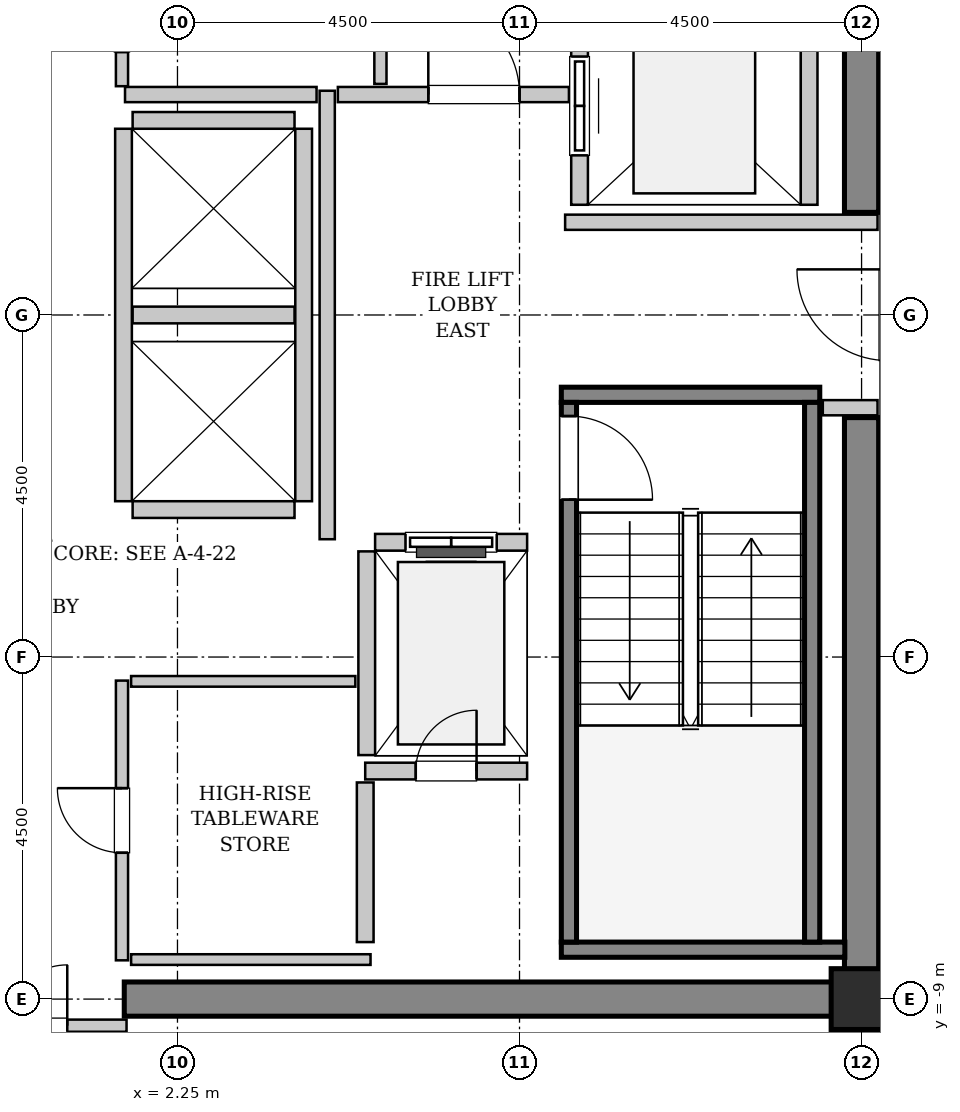
"""IFC4 building model, lengths in metres.
Left out: names, types, materials, properties, quantities, classifications, styles, units other than length and angle.
Written with IfcOpenShell. Run it as: python <this file> out.ifc"""

import sys

from ifc_helpers import new_model, si_unit, direction, frame, frame_2d, origin, origin_2d, place, context, subcontext, project, spatial, rectangle, hollow_rectangle, extrude, source, transform, mapped, element, fill, save


model = new_model("IFC4")
c1 = context("Model", 3, precision=1e-05, world=origin(), true_north=direction((0.0, 1.0)))
c2 = subcontext(c1, "Body", "Model", "MODEL_VIEW")
j1 = project(units=[si_unit("LENGTHUNIT", "METRE"), si_unit("PLANEANGLEUNIT", "RADIAN")], contexts=[c1])
p1 = place(None, origin())
s1 = spatial("IfcSite", under=j1, at=p1, CompositionType="ELEMENT")
p2 = place(p1, origin())
s2 = spatial("IfcBuilding", under=s1, at=p2, CompositionType="ELEMENT")
p3 = place(p2, frame((0.0, 0.0, 283.6)))
s3 = spatial("IfcBuildingStorey", under=s2, at=p3, CompositionType="ELEMENT", Elevation=283.6)
m1 = source(origin(), c2, "Body", "SweptSolid", [
    extrude(rectangle(XDim=9.925, YDim=0.45, at=frame_2d((4.962, 0.0))), origin(), (0.0, 0.0, 1.0), 3.8),
])
p4 = place(p3, frame((1.55, -9.0, 0.0), z_axis=(0.0, 0.0, 1.0), x_axis=(1.0, 0.0, 0.0)))
e1 = element("IfcWall", 1, at=p4, inside=s3, PredefinedType="SHEAR", context=c2, shape_type="MappedRepresentation", body=[
    mapped(m1, transform((0.0, 0.0, 0.0), x_axis=(1.0, 0.0, 0.0), y_axis=(0.0, 1.0, 0.0), z_axis=(0.0, 0.0, 1.0), scale=1.0)),
])
m2 = source(origin(), c2, "Body", "SweptSolid", [
    extrude(rectangle(XDim=7.425, YDim=0.45, at=frame_2d((3.712, 0.0))), origin(), (0.0, 0.0, 1.0), 3.8),
])
for number, where, z_axis, x_axis in (
    (2, (11.25, -8.775, 0.0), (0.0, 0.0, 1.0), (0.0, 1.0, 0.0)),
    (3, (11.25, 1.35, 0.0), (0.0, 0.0, 1.0), (0.0, 1.0, 0.0)),
):
    element("IfcWall", number, at=place(p3, frame(where, z_axis=z_axis, x_axis=x_axis)), inside=s3, PredefinedType="SHEAR", context=c2, shape_type="MappedRepresentation", body=[
        mapped(m2, transform((0.0, 0.0, 0.0), x_axis=(1.0, 0.0, 0.0), y_axis=(0.0, 1.0, 0.0), z_axis=(0.0, 0.0, 1.0), scale=1.0)),
    ])
m3 = source(origin(), c2, "Body", "SweptSolid", [
    extrude(hollow_rectangle(XDim=0.8, YDim=0.8, WallThickness=0.04, InnerFilletRadius=0.04, OuterFilletRadius=0.08, at=origin_2d()), origin(), (0.0, 0.0, 1.0), 3.8),
])
p5 = place(p3, frame((11.25, -9.0, 0.0), z_axis=(0.0, 0.0, 1.0), x_axis=(1.0, 0.0, 0.0)))
e4 = element("IfcColumn", 4, at=p5, inside=s3, PredefinedType="COLUMN", context=c2, shape_type="MappedRepresentation", body=[
    mapped(m3, transform((0.0, 0.0, 0.0), x_axis=(1.0, 0.0, 0.0), y_axis=(0.0, 1.0, 0.0), z_axis=(0.0, 0.0, 1.0), scale=1.0)),
])
m4 = source(origin(), c2, "Body", "SweptSolid", [
    extrude(rectangle(XDim=3.4, YDim=0.2, at=frame_2d((1.7, 0.0))), origin(), (0.0, 0.0, 1.0), 3.8),
])
p6 = place(p3, frame((7.3, -1.05, 0.0), z_axis=(0.0, 0.0, 1.0), x_axis=(1.0, 0.0, 0.0)))
e5 = element("IfcWall", 5, at=p6, inside=s3, PredefinedType="SOLIDWALL", context=c2, shape_type="MappedRepresentation", body=[
    mapped(m4, transform((0.0, 0.0, 0.0), x_axis=(1.0, 0.0, 0.0), y_axis=(0.0, 1.0, 0.0), z_axis=(0.0, 0.0, 1.0), scale=1.0)),
])
m5 = source(origin(), c2, "Body", "SweptSolid", [
    extrude(rectangle(XDim=3.73, YDim=0.2, at=frame_2d((1.865, 0.0))), origin(), (0.0, 0.0, 1.0), 3.8),
])
p7 = place(p3, frame((7.3, -8.35, 0.0), z_axis=(0.0, 0.0, 1.0), x_axis=(1.0, 0.0, 0.0)))
e6 = element("IfcWall", 6, at=p7, inside=s3, PredefinedType="SOLIDWALL", context=c2, shape_type="MappedRepresentation", body=[
    mapped(m5, transform((0.0, 0.0, 0.0), x_axis=(1.0, 0.0, 0.0), y_axis=(0.0, 1.0, 0.0), z_axis=(0.0, 0.0, 1.0), scale=1.0)),
])
m6 = source(origin(), c2, "Body", "SweptSolid", [
    extrude(rectangle(XDim=7.1, YDim=0.2, at=frame_2d((3.55, 0.0))), origin(), (0.0, 0.0, 1.0), 3.8),
])
p8 = place(p3, frame((7.4, -1.15, 0.0), z_axis=(0.0, 0.0, 1.0), x_axis=(0.0, -1.0, 0.0)))
e7 = element("IfcWall", 7, at=p8, inside=s3, PredefinedType="SOLIDWALL", context=c2, shape_type="MappedRepresentation", body=[
    mapped(m6, transform((0.0, 0.0, 0.0), x_axis=(1.0, 0.0, 0.0), y_axis=(0.0, 1.0, 0.0), z_axis=(0.0, 0.0, 1.0), scale=1.0)),
])
p9 = place(p8, frame((0.18, 0.0, 0.0)))
e8 = element("IfcOpeningElement", 8, at=p9, cuts=e7, PredefinedType="OPENING", context=c2, shape_type="SweptSolid", body=[
    extrude(rectangle(XDim=1.1, YDim=2.15, at=frame_2d((0.55, 1.075))), frame((0.0, 0.11, 0.0), z_axis=(0.0, -1.0, 0.0), x_axis=(1.0, 0.0, 0.0)), (0.0, 0.0, 1.0), 0.22),
])
p10 = place(p3, frame((10.6, -1.15, 0.0), z_axis=(0.0, 0.0, 1.0), x_axis=(0.0, -1.0, 0.0)))
e9 = element("IfcWall", 9, at=p10, inside=s3, PredefinedType="SOLIDWALL", context=c2, shape_type="MappedRepresentation", body=[
    mapped(m6, transform((0.0, 0.0, 0.0), x_axis=(1.0, 0.0, 0.0), y_axis=(0.0, 1.0, 0.0), z_axis=(0.0, 0.0, 1.0), scale=1.0)),
])
m7 = source(origin(), c2, "Body", "SweptSolid", [
    extrude(rectangle(XDim=2.0, YDim=0.22, at=frame_2d((1.0, 0.0))), origin(), (0.0, 0.0, 1.0), 3.535),
])
p11 = place(p3, frame((6.85, -2.99, 0.0), z_axis=(0.0, 0.0, 1.0), x_axis=(-1.0, 0.0, 0.0)))
e10 = element("IfcWall", 10, at=p11, inside=s3, PredefinedType="SOLIDWALL", context=c2, shape_type="MappedRepresentation", body=[
    mapped(m7, transform((0.0, 0.0, 0.0), x_axis=(1.0, 0.0, 0.0), y_axis=(0.0, 1.0, 0.0), z_axis=(0.0, 0.0, 1.0), scale=1.0)),
])
p12 = place(p11, frame((0.4, 0.0, 0.0)))
e11 = element("IfcOpeningElement", 11, at=p12, cuts=e10, PredefinedType="OPENING", context=c2, shape_type="SweptSolid", body=[
    extrude(rectangle(XDim=1.2, YDim=2.2, at=frame_2d((0.6, 1.1))), frame((0.0, 0.12, 0.0), z_axis=(0.0, -1.0, 0.0), x_axis=(1.0, 0.0, 0.0)), (0.0, 0.0, 1.0), 0.24),
])
m8 = source(origin(), c2, "Body", "SweptSolid", [
    extrude(rectangle(XDim=2.68, YDim=0.22, at=frame_2d((1.34, 0.0))), origin(), (0.0, 0.0, 1.0), 3.535),
])
p13 = place(p3, frame((4.74, -3.11, 0.0), z_axis=(0.0, 0.0, 1.0), x_axis=(0.0, -1.0, 0.0)))
e12 = element("IfcWall", 12, at=p13, inside=s3, PredefinedType="SOLIDWALL", context=c2, shape_type="MappedRepresentation", body=[
    mapped(m8, transform((0.0, 0.0, 0.0), x_axis=(1.0, 0.0, 0.0), y_axis=(0.0, 1.0, 0.0), z_axis=(0.0, 0.0, 1.0), scale=1.0)),
])
m9 = source(origin(), c2, "Body", "SweptSolid", [
    extrude(rectangle(XDim=5.45, YDim=0.22, at=frame_2d((2.725, 0.0))), origin(), (0.0, 0.0, 1.0), 3.535),
])
p14 = place(p3, frame((7.54, 6.9, 0.0), z_axis=(0.0, 0.0, 1.0), x_axis=(0.0, -1.0, 0.0)))
e13 = element("IfcWall", 13, at=p14, inside=s3, PredefinedType="SOLIDWALL", context=c2, shape_type="MappedRepresentation", body=[
    mapped(m9, transform((0.0, 0.0, 0.0), x_axis=(1.0, 0.0, 0.0), y_axis=(0.0, 1.0, 0.0), z_axis=(0.0, 0.0, 1.0), scale=1.0)),
])
p15 = place(p14, frame((3.5, 0.0, 0.0)))
e14 = element("IfcOpeningElement", 14, at=p15, cuts=e13, PredefinedType="OPENING", context=c2, shape_type="SweptSolid", body=[
    extrude(rectangle(XDim=1.3, YDim=2.3, at=frame_2d((0.65, 1.15))), frame((0.0, 0.12, 0.0), z_axis=(0.0, -1.0, 0.0), x_axis=(1.0, 0.0, 0.0)), (0.0, 0.0, 1.0), 0.24),
])
p16 = place(p14, frame((0.65, 0.0, 0.0)))
e15 = element("IfcOpeningElement", 15, at=p16, cuts=e13, PredefinedType="OPENING", context=c2, shape_type="SweptSolid", body=[
    extrude(rectangle(XDim=1.3, YDim=2.3, at=frame_2d((0.65, 1.15))), frame((0.0, 0.12, 0.0), z_axis=(0.0, -1.0, 0.0), x_axis=(1.0, 0.0, 0.0)), (0.0, 0.0, 1.0), 0.24),
])
p17 = place(p3, frame((10.56, 1.45, 0.0), z_axis=(0.0, 0.0, 1.0), x_axis=(0.0, 1.0, 0.0)))
e16 = element("IfcWall", 16, at=p17, inside=s3, PredefinedType="SOLIDWALL", context=c2, shape_type="MappedRepresentation", body=[
    mapped(m9, transform((0.0, 0.0, 0.0), x_axis=(1.0, 0.0, 0.0), y_axis=(0.0, 1.0, 0.0), z_axis=(0.0, 0.0, 1.0), scale=1.0)),
])
m10 = source(origin(), c2, "Body", "SweptSolid", [
    extrude(rectangle(XDim=4.9, YDim=0.22, at=frame_2d((2.45, 0.0))), origin(), (0.0, 0.0, 1.0), 3.535),
])
for number, where, z_axis, x_axis in (
    (17, (1.54, 2.45, 0.0), (0.0, 0.0, 1.0), (0.0, -1.0, 0.0)),
    (18, (3.91, -2.45, 0.0), (0.0, 0.0, 1.0), (0.0, 1.0, 0.0)),
):
    element("IfcWall", number, at=place(p3, frame(where, z_axis=z_axis, x_axis=x_axis)), inside=s3, PredefinedType="SOLIDWALL", context=c2, shape_type="MappedRepresentation", body=[
        mapped(m10, transform((0.0, 0.0, 0.0), x_axis=(1.0, 0.0, 0.0), y_axis=(0.0, 1.0, 0.0), z_axis=(0.0, 0.0, 1.0), scale=1.0)),
    ])
m11 = source(origin(), c2, "Body", "SweptSolid", [
    extrude(rectangle(XDim=2.13, YDim=0.22, at=frame_2d((1.065, 0.0))), origin(), (0.0, 0.0, 1.0), 3.535),
])
for number, where, z_axis, x_axis in (
    (19, (1.66, -2.56, 0.0), (0.0, 0.0, 1.0), (1.0, 0.0, 0.0)),
    (20, (1.66, 0.0, 0.0), (0.0, 0.0, 1.0), (1.0, 0.0, 0.0)),
    (21, (3.79, 2.56, 0.0), (0.0, 0.0, 1.0), (-1.0, 0.0, 0.0)),
):
    element("IfcWall", number, at=place(p3, frame(where, z_axis=z_axis, x_axis=x_axis)), inside=s3, PredefinedType="SOLIDWALL", context=c2, shape_type="MappedRepresentation", body=[
        mapped(m11, transform((0.0, 0.0, 0.0), x_axis=(1.0, 0.0, 0.0), y_axis=(0.0, 1.0, 0.0), z_axis=(0.0, 0.0, 1.0), scale=1.0)),
    ])
p18 = place(p3, frame((4.72, -6.0, 0.0), z_axis=(0.0, 0.0, 1.0), x_axis=(1.0, 0.0, 0.0)))
e22 = element("IfcWall", 22, at=p18, inside=s3, PredefinedType="SOLIDWALL", context=c2, shape_type="MappedRepresentation", body=[
    mapped(m11, transform((0.0, 0.0, 0.0), x_axis=(1.0, 0.0, 0.0), y_axis=(0.0, 1.0, 0.0), z_axis=(0.0, 0.0, 1.0), scale=1.0)),
])
p19 = place(p18, frame((0.665, 0.0, 0.0)))
e23 = element("IfcOpeningElement", 23, at=p19, cuts=e22, PredefinedType="OPENING", context=c2, shape_type="SweptSolid", body=[
    extrude(rectangle(XDim=0.8, YDim=2.0, at=frame_2d((0.4, 1.0))), frame((0.0, 0.12, 0.0), z_axis=(0.0, -1.0, 0.0), x_axis=(1.0, 0.0, 0.0)), (0.0, 0.0, 1.0), 0.24),
])
m12 = source(origin(), c2, "Body", "SweptSolid", [
    extrude(rectangle(XDim=2.1, YDim=0.22, at=frame_2d((1.05, 0.0))), origin(), (0.0, 0.0, 1.0), 3.535),
])
p20 = place(p3, frame((4.72, -8.25, 0.0), z_axis=(0.0, 0.0, 1.0), x_axis=(0.0, 1.0, 0.0)))
e24 = element("IfcWall", 24, at=p20, inside=s3, PredefinedType="SOLIDWALL", context=c2, shape_type="MappedRepresentation", body=[
    mapped(m12, transform((0.0, 0.0, 0.0), x_axis=(1.0, 0.0, 0.0), y_axis=(0.0, 1.0, 0.0), z_axis=(0.0, 0.0, 1.0), scale=1.0)),
])
m13 = source(origin(), c2, "Body", "SweptSolid", [
    extrude(rectangle(XDim=5.9, YDim=0.2, at=frame_2d((2.95, 0.0))), origin(), (0.0, 0.0, 1.0), 3.535),
])
p21 = place(p3, frame((4.22, -2.95, 0.0), z_axis=(0.0, 0.0, 1.0), x_axis=(0.0, 1.0, 0.0)))
e25 = element("IfcWall", 25, at=p21, inside=s3, PredefinedType="PARTITIONING", context=c2, shape_type="MappedRepresentation", body=[
    mapped(m13, transform((0.0, 0.0, 0.0), x_axis=(1.0, 0.0, 0.0), y_axis=(0.0, 1.0, 0.0), z_axis=(0.0, 0.0, 1.0), scale=1.0)),
])
m14 = source(origin(), c2, "Body", "SweptSolid", [
    extrude(rectangle(XDim=2.52, YDim=0.2, at=frame_2d((1.26, 0.0))), origin(), (0.0, 0.0, 1.0), 3.535),
])
p22 = place(p3, frame((1.56, 2.9, 0.0), z_axis=(0.0, 0.0, 1.0), x_axis=(1.0, 0.0, 0.0)))
e26 = element("IfcWall", 26, at=p22, inside=s3, PredefinedType="PARTITIONING", context=c2, shape_type="MappedRepresentation", body=[
    mapped(m14, transform((0.0, 0.0, 0.0), x_axis=(1.0, 0.0, 0.0), y_axis=(0.0, 1.0, 0.0), z_axis=(0.0, 0.0, 1.0), scale=1.0)),
])
m15 = source(origin(), c2, "Body", "SweptSolid", [
    extrude(rectangle(XDim=3.04, YDim=0.2, at=frame_2d((1.52, 0.0))), origin(), (0.0, 0.0, 1.0), 3.535),
])
p23 = place(p3, frame((4.36, 2.9, 0.0), z_axis=(0.0, 0.0, 1.0), x_axis=(1.0, 0.0, 0.0)))
e27 = element("IfcWall", 27, at=p23, inside=s3, PredefinedType="PARTITIONING", context=c2, shape_type="MappedRepresentation", body=[
    mapped(m15, transform((0.0, 0.0, 0.0), x_axis=(1.0, 0.0, 0.0), y_axis=(0.0, 1.0, 0.0), z_axis=(0.0, 0.0, 1.0), scale=1.0)),
])
p24 = place(p23, frame((1.19, 0.0, 0.0)))
e28 = element("IfcOpeningElement", 28, at=p24, cuts=e27, PredefinedType="OPENING", context=c2, shape_type="SweptSolid", body=[
    extrude(rectangle(XDim=1.2, YDim=2.15, at=frame_2d((0.6, 1.075))), frame((0.0, 0.11, 0.0), z_axis=(0.0, -1.0, 0.0), x_axis=(1.0, 0.0, 0.0)), (0.0, 0.0, 1.0), 0.22),
])
m16 = source(origin(), c2, "Body", "SweptSolid", [
    extrude(rectangle(XDim=4.11, YDim=0.2, at=frame_2d((2.055, 0.0))), origin(), (0.0, 0.0, 1.0), 3.535),
])
p25 = place(p3, frame((7.35, 1.22, 0.0), z_axis=(0.0, 0.0, 1.0), x_axis=(1.0, 0.0, 0.0)))
e29 = element("IfcWall", 29, at=p25, inside=s3, PredefinedType="PARTITIONING", context=c2, shape_type="MappedRepresentation", body=[
    mapped(m16, transform((0.0, 0.0, 0.0), x_axis=(1.0, 0.0, 0.0), y_axis=(0.0, 1.0, 0.0), z_axis=(0.0, 0.0, 1.0), scale=1.0)),
])
m17 = source(origin(), c2, "Body", "SweptSolid", [
    extrude(rectangle(XDim=0.72, YDim=0.2, at=frame_2d((0.36, 0.0))), origin(), (0.0, 0.0, 1.0), 3.535),
])
p26 = place(p3, frame((10.74, -1.22, 0.0), z_axis=(0.0, 0.0, 1.0), x_axis=(1.0, 0.0, 0.0)))
e30 = element("IfcWall", 30, at=p26, inside=s3, PredefinedType="PARTITIONING", context=c2, shape_type="MappedRepresentation", body=[
    mapped(m17, transform((0.0, 0.0, 0.0), x_axis=(1.0, 0.0, 0.0), y_axis=(0.0, 1.0, 0.0), z_axis=(0.0, 0.0, 1.0), scale=1.0)),
])
m18 = source(origin(), c2, "Body", "SweptSolid", [
    extrude(rectangle(XDim=3.16, YDim=0.16, at=frame_2d((1.58, 0.0))), origin(), (0.0, 0.0, 1.0), 2.625),
])
p27 = place(p3, frame((-1.58, -9.35, 0.0), z_axis=(0.0, 0.0, 1.0), x_axis=(1.0, 0.0, 0.0)))
e31 = element("IfcWall", 31, at=p27, inside=s3, PredefinedType="PARTITIONING", context=c2, shape_type="MappedRepresentation", body=[
    mapped(m18, transform((0.0, 0.0, 0.0), x_axis=(1.0, 0.0, 0.0), y_axis=(0.0, 1.0, 0.0), z_axis=(0.0, 0.0, 1.0), scale=1.0)),
])
p28 = place(p27, frame((0.78, 0.0, 0.0)))
e32 = element("IfcOpeningElement", 32, at=p28, cuts=e31, PredefinedType="OPENING", context=c2, shape_type="SweptSolid", body=[
    extrude(rectangle(XDim=1.6, YDim=2.3, at=frame_2d((0.8, 1.15))), frame((0.0, 0.09, 0.0), z_axis=(0.0, -1.0, 0.0), x_axis=(1.0, 0.0, 0.0)), (0.0, 0.0, 1.0), 0.18),
])
m19 = source(origin(), c2, "Body", "SweptSolid", [
    extrude(rectangle(XDim=5.45, YDim=0.16, at=frame_2d((2.725, 0.0))), origin(), (0.0, 0.0, 1.0), 3.535),
])
p29 = place(p3, frame((4.92, 3.04, 0.0), z_axis=(0.0, 0.0, 1.0), x_axis=(0.0, 1.0, 0.0)))
e33 = element("IfcWall", 33, at=p29, inside=s3, PredefinedType="PARTITIONING", context=c2, shape_type="MappedRepresentation", body=[
    mapped(m19, transform((0.0, 0.0, 0.0), x_axis=(1.0, 0.0, 0.0), y_axis=(0.0, 1.0, 0.0), z_axis=(0.0, 0.0, 1.0), scale=1.0)),
])
m20 = source(origin(), c2, "Body", "SweptSolid", [
    extrude(rectangle(XDim=1.75, YDim=0.16, at=frame_2d((0.875, 0.0))), origin(), (0.0, 0.0, 1.0), 3.535),
])
p30 = place(p3, frame((1.52, 3.01, 0.0), z_axis=(0.0, 0.0, 1.0), x_axis=(0.0, 1.0, 0.0)))
e34 = element("IfcWall", 34, at=p30, inside=s3, PredefinedType="PARTITIONING", context=c2, shape_type="MappedRepresentation", body=[
    mapped(m20, transform((0.0, 0.0, 0.0), x_axis=(1.0, 0.0, 0.0), y_axis=(0.0, 1.0, 0.0), z_axis=(0.0, 0.0, 1.0), scale=1.0)),
])
p31 = place(p30, frame((0.45, 0.0, 0.0)))
e35 = element("IfcOpeningElement", 35, at=p31, cuts=e34, PredefinedType="OPENING", context=c2, shape_type="SweptSolid", body=[
    extrude(rectangle(XDim=0.85, YDim=2.1, at=frame_2d((0.425, 1.05))), frame((0.0, 0.09, 0.0), z_axis=(0.0, -1.0, 0.0), x_axis=(1.0, 0.0, 0.0)), (0.0, 0.0, 1.0), 0.18),
])
m21 = source(origin(), c2, "Body", "SweptSolid", [
    extrude(rectangle(XDim=3.68, YDim=0.16, at=frame_2d((1.84, 0.0))), origin(), (0.0, 0.0, 1.0), 3.535),
])
p32 = place(p3, frame((1.52, -8.49, 0.0), z_axis=(0.0, 0.0, 1.0), x_axis=(0.0, 1.0, 0.0)))
e36 = element("IfcWall", 36, at=p32, inside=s3, PredefinedType="PARTITIONING", context=c2, shape_type="MappedRepresentation", body=[
    mapped(m21, transform((0.0, 0.0, 0.0), x_axis=(1.0, 0.0, 0.0), y_axis=(0.0, 1.0, 0.0), z_axis=(0.0, 0.0, 1.0), scale=1.0)),
])
p33 = place(p32, frame((1.415, 0.0, 0.0)))
e37 = element("IfcOpeningElement", 37, at=p33, cuts=e36, PredefinedType="OPENING", context=c2, shape_type="SweptSolid", body=[
    extrude(rectangle(XDim=0.85, YDim=2.1, at=frame_2d((0.425, 1.05))), frame((0.0, 0.09, 0.0), z_axis=(0.0, -1.0, 0.0), x_axis=(1.0, 0.0, 0.0)), (0.0, 0.0, 1.0), 0.18),
])
m22 = source(origin(), c2, "Body", "SweptSolid", [
    extrude(rectangle(XDim=2.95, YDim=0.14, at=frame_2d((1.475, 0.0))), origin(), (0.0, 0.0, 1.0), 3.535),
])
p34 = place(p3, frame((1.64, -4.82, 0.0), z_axis=(0.0, 0.0, 1.0), x_axis=(1.0, 0.0, 0.0)))
e38 = element("IfcWall", 38, at=p34, inside=s3, PredefinedType="PARTITIONING", context=c2, shape_type="MappedRepresentation", body=[
    mapped(m22, transform((0.0, 0.0, 0.0), x_axis=(1.0, 0.0, 0.0), y_axis=(0.0, 1.0, 0.0), z_axis=(0.0, 0.0, 1.0), scale=1.0)),
])
m23 = source(origin(), c2, "Body", "SweptSolid", [
    extrude(rectangle(XDim=3.15, YDim=0.14, at=frame_2d((1.575, 0.0))), origin(), (0.0, 0.0, 1.0), 3.535),
])
p35 = place(p3, frame((1.64, -8.48, 0.0), z_axis=(0.0, 0.0, 1.0), x_axis=(1.0, 0.0, 0.0)))
e39 = element("IfcWall", 39, at=p35, inside=s3, PredefinedType="PARTITIONING", context=c2, shape_type="MappedRepresentation", body=[
    mapped(m23, transform((0.0, 0.0, 0.0), x_axis=(1.0, 0.0, 0.0), y_axis=(0.0, 1.0, 0.0), z_axis=(0.0, 0.0, 1.0), scale=1.0)),
])
m24 = source(origin(), c2, "Body", "SweptSolid", [
    extrude(rectangle(XDim=1.1, YDim=2.15, at=frame_2d((0.55, 1.075))), frame((0.0, 0.025, 0.0), z_axis=(0.0, -1.0, 0.0), x_axis=(1.0, 0.0, 0.0)), (0.0, 0.0, 1.0), 0.05),
])
p36 = place(p9, origin())
e40 = element("IfcDoor", 40, at=p36, inside=s3, OperationType="SINGLE_SWING_RIGHT", PredefinedType="DOOR", context=c2, shape_type="MappedRepresentation", body=[
    mapped(m24, transform((0.0, 0.0, 0.0), x_axis=(1.0, 0.0, 0.0), y_axis=(0.0, 1.0, 0.0), z_axis=(0.0, 0.0, 1.0), scale=1.0)),
])
fill(e8, e40)
m25 = source(origin(), c2, "Body", "SweptSolid", [
    extrude(rectangle(XDim=1.2, YDim=2.2, at=frame_2d((0.6, 1.1))), frame((0.0, 0.025, 0.0), z_axis=(0.0, -1.0, 0.0), x_axis=(1.0, 0.0, 0.0)), (0.0, 0.0, 1.0), 0.05),
])
p37 = place(p12, origin())
e41 = element("IfcDoor", 41, at=p37, inside=s3, OperationType="SLIDING_TO_LEFT", PredefinedType="DOOR", context=c2, shape_type="MappedRepresentation", body=[
    mapped(m25, transform((0.0, 0.0, 0.0), x_axis=(1.0, 0.0, 0.0), y_axis=(0.0, 1.0, 0.0), z_axis=(0.0, 0.0, 1.0), scale=1.0)),
])
fill(e11, e41)
m26 = source(origin(), c2, "Body", "SweptSolid", [
    extrude(rectangle(XDim=1.3, YDim=2.3, at=frame_2d((0.65, 1.15))), frame((0.0, 0.025, 0.0), z_axis=(0.0, -1.0, 0.0), x_axis=(1.0, 0.0, 0.0)), (0.0, 0.0, 1.0), 0.05),
])
p38 = place(p15, origin())
e42 = element("IfcDoor", 42, at=p38, inside=s3, OperationType="SLIDING_TO_RIGHT", PredefinedType="DOOR", context=c2, shape_type="MappedRepresentation", body=[
    mapped(m26, transform((0.0, 0.0, 0.0), x_axis=(1.0, 0.0, 0.0), y_axis=(0.0, 1.0, 0.0), z_axis=(0.0, 0.0, 1.0), scale=1.0)),
])
fill(e14, e42)
m27 = source(origin(), c2, "Body", "SweptSolid", [
    extrude(rectangle(XDim=0.8, YDim=2.0, at=frame_2d((0.4, 1.0))), frame((0.0, 0.025, 0.0), z_axis=(0.0, -1.0, 0.0), x_axis=(1.0, 0.0, 0.0)), (0.0, 0.0, 1.0), 0.05),
])
p39 = place(p19, origin())
e43 = element("IfcDoor", 43, at=p39, inside=s3, OperationType="SINGLE_SWING_RIGHT", PredefinedType="TRAPDOOR", context=c2, shape_type="MappedRepresentation", body=[
    mapped(m27, transform((0.0, 0.0, 0.0), x_axis=(1.0, 0.0, 0.0), y_axis=(0.0, 1.0, 0.0), z_axis=(0.0, 0.0, 1.0), scale=1.0)),
])
fill(e23, e43)
m28 = source(origin(), c2, "Body", "SweptSolid", [
    extrude(rectangle(XDim=1.2, YDim=2.15, at=frame_2d((0.6, 1.075))), frame((0.0, 0.025, 0.0), z_axis=(0.0, -1.0, 0.0), x_axis=(1.0, 0.0, 0.0)), (0.0, 0.0, 1.0), 0.05),
])
p40 = place(p24, origin())
e44 = element("IfcDoor", 44, at=p40, inside=s3, OperationType="SINGLE_SWING_LEFT", PredefinedType="DOOR", context=c2, shape_type="MappedRepresentation", body=[
    mapped(m28, transform((0.0, 0.0, 0.0), x_axis=(1.0, 0.0, 0.0), y_axis=(0.0, 1.0, 0.0), z_axis=(0.0, 0.0, 1.0), scale=1.0)),
])
fill(e28, e44)
m29 = source(origin(), c2, "Body", "SweptSolid", [
    extrude(rectangle(XDim=1.6, YDim=2.3, at=frame_2d((0.8, 1.15))), frame((0.0, 0.025, 0.0), z_axis=(0.0, -1.0, 0.0), x_axis=(1.0, 0.0, 0.0)), (0.0, 0.0, 1.0), 0.05),
])
p41 = place(p28, origin())
e45 = element("IfcDoor", 45, at=p41, inside=s3, OperationType="DOUBLE_DOOR_SINGLE_SWING", PredefinedType="DOOR", context=c2, shape_type="MappedRepresentation", body=[
    mapped(m29, transform((0.0, 0.0, 0.0), x_axis=(1.0, 0.0, 0.0), y_axis=(0.0, 1.0, 0.0), z_axis=(0.0, 0.0, 1.0), scale=1.0)),
])
fill(e32, e45)
m30 = source(origin(), c2, "Body", "SweptSolid", [
    extrude(rectangle(XDim=0.85, YDim=2.1, at=frame_2d((0.425, 1.05))), frame((0.0, 0.025, 0.0), z_axis=(0.0, -1.0, 0.0), x_axis=(1.0, 0.0, 0.0)), (0.0, 0.0, 1.0), 0.05),
])
p42 = place(p33, origin())
e46 = element("IfcDoor", 46, at=p42, inside=s3, OperationType="SINGLE_SWING_RIGHT", PredefinedType="DOOR", context=c2, shape_type="MappedRepresentation", body=[
    mapped(m30, transform((0.0, 0.0, 0.0), x_axis=(1.0, 0.0, 0.0), y_axis=(0.0, 1.0, 0.0), z_axis=(0.0, 0.0, 1.0), scale=1.0)),
])
fill(e37, e46)
save(model, sys.argv[1])
